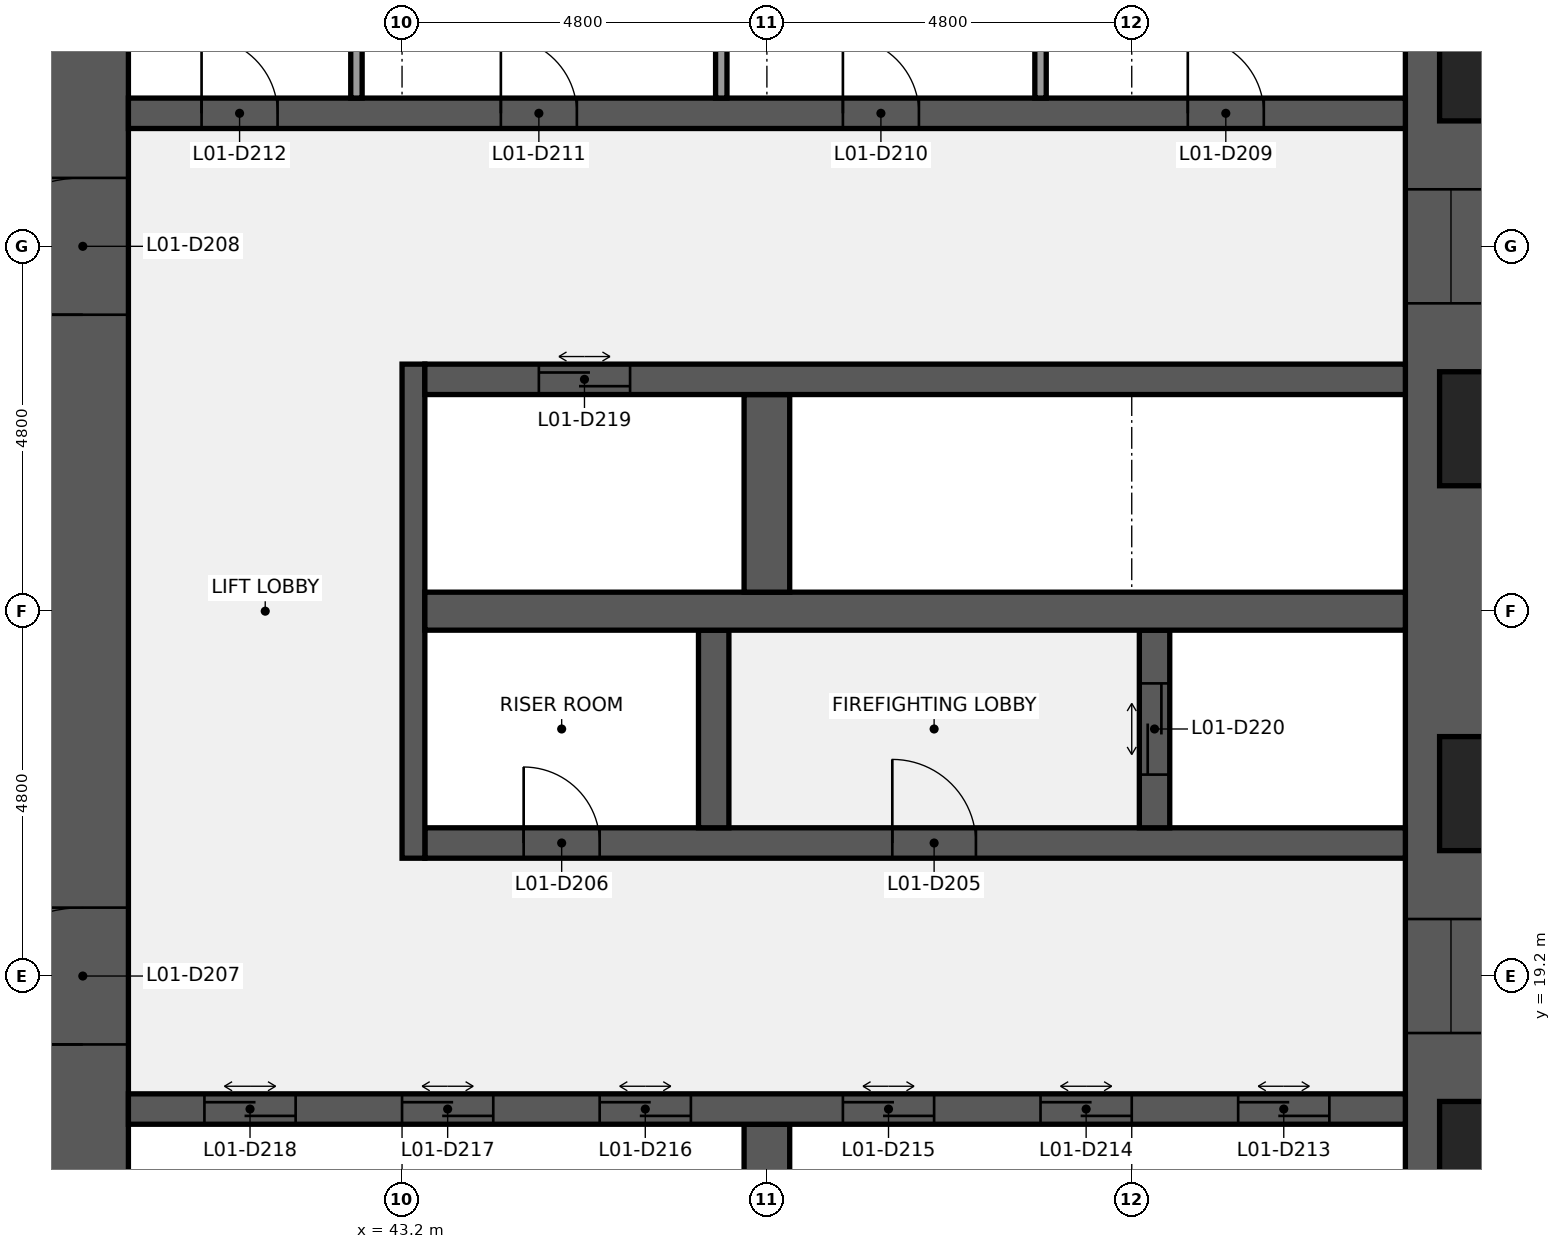
"""IFC4 building model, lengths in metres.
Left out: names, types, materials, properties, quantities, classifications, styles, units other than length and angle.
Written with IfcOpenShell. Run it as: python <this file> out.ifc"""

import sys

from ifc_helpers import new_model, si_unit, direction, frame, frame_2d, origin, place, context, subcontext, project, spatial, rectangle, extrude, element, fill, save


model = new_model("IFC4")
c1 = context("Model", 3, precision=1e-05, world=origin(), true_north=direction((0.0, 1.0)))
c2 = subcontext(c1, "Body", "Model", "MODEL_VIEW")
j1 = project(units=[si_unit("LENGTHUNIT", "METRE"), si_unit("PLANEANGLEUNIT", "RADIAN")], contexts=[c1])
p1 = place(None, origin())
s1 = spatial("IfcSite", under=j1, at=p1, CompositionType="ELEMENT")
p2 = place(p1, origin())
s2 = spatial("IfcBuilding", under=s1, at=p2, CompositionType="ELEMENT")
p3 = place(p2, frame((0.0, 0.0, 12.6)))
s3 = spatial("IfcBuildingStorey", under=s2, at=p3, CompositionType="ELEMENT", Elevation=12.6)
p4 = place(p3, frame((57.0, 38.4, 0.0), z_axis=(0.0, 0.0, 1.0), x_axis=(0.0, -1.0, 0.0)))
e1 = element("IfcWall", 1, at=p4, inside=s3, PredefinedType="SHEAR", context=c2, shape_type="SweptSolid", body=[
    extrude(rectangle(XDim=28.8, YDim=1.2, at=frame_2d((14.4, 0.0))), origin(), (0.0, 0.0, 1.0), 4.24),
])
p5 = place(p4, frame((18.45, 0.0, 0.9)))
e2 = element("IfcOpeningElement", 2, at=p5, cuts=e1, PredefinedType="OPENING", context=c2, shape_type="SweptSolid", body=[
    extrude(rectangle(XDim=1.5, YDim=1.5, at=frame_2d((0.75, 0.75))), frame((0.0, 0.61, 0.0), z_axis=(0.0, -1.0, 0.0), x_axis=(1.0, 0.0, 0.0)), (0.0, 0.0, 1.0), 1.22),
])
p6 = place(p4, frame((8.85, 0.0, 0.9)))
e3 = element("IfcOpeningElement", 3, at=p6, cuts=e1, PredefinedType="OPENING", context=c2, shape_type="SweptSolid", body=[
    extrude(rectangle(XDim=1.5, YDim=1.5, at=frame_2d((0.75, 0.75))), frame((0.0, 0.61, 0.0), z_axis=(0.0, -1.0, 0.0), x_axis=(1.0, 0.0, 0.0)), (0.0, 0.0, 1.0), 1.22),
])
p7 = place(p3, frame((39.0, 9.6, 0.0), z_axis=(0.0, 0.0, 1.0), x_axis=(0.0, 1.0, 0.0)))
e4 = element("IfcWall", 4, at=p7, inside=s3, PredefinedType="SHEAR", context=c2, shape_type="SweptSolid", body=[
    extrude(rectangle(XDim=28.8, YDim=1.2, at=frame_2d((14.4, 0.0))), origin(), (0.0, 0.0, 1.0), 4.24),
])
p8 = place(p7, frame((8.7, 0.0, 0.0)))
e5 = element("IfcOpeningElement", 5, at=p8, cuts=e4, PredefinedType="OPENING", context=c2, shape_type="SweptSolid", body=[
    extrude(rectangle(XDim=1.8, YDim=2.1, at=frame_2d((0.9, 1.05))), frame((0.0, 0.61, 0.0), z_axis=(0.0, -1.0, 0.0), x_axis=(1.0, 0.0, 0.0)), (0.0, 0.0, 1.0), 1.22),
])
p9 = place(p7, frame((18.3, 0.0, 0.0)))
e6 = element("IfcOpeningElement", 6, at=p9, cuts=e4, PredefinedType="OPENING", context=c2, shape_type="SweptSolid", body=[
    extrude(rectangle(XDim=1.8, YDim=2.1, at=frame_2d((0.9, 1.05))), frame((0.0, 0.61, 0.0), z_axis=(0.0, -1.0, 0.0), x_axis=(1.0, 0.0, 0.0)), (0.0, 0.0, 1.0), 1.22),
])
p10 = place(p3, frame((48.0, 14.65, 0.0), z_axis=(0.0, 0.0, 1.0), x_axis=(0.0, 1.0, 0.0)))
e7 = element("IfcWall", 7, at=p10, inside=s3, PredefinedType="SHEAR", context=c2, shape_type="SweptSolid", body=[
    extrude(rectangle(XDim=2.6, YDim=0.6, at=frame_2d((1.3, 0.0))), origin(), (0.0, 0.0, 1.0), 4.24),
])
p11 = place(p3, frame((39.6, 17.45, 0.0), z_axis=(0.0, 0.0, 1.0), x_axis=(1.0, 0.0, 0.0)))
e8 = element("IfcWall", 8, at=p11, inside=s3, PredefinedType="SHEAR", context=c2, shape_type="SweptSolid", body=[
    extrude(rectangle(XDim=16.8, YDim=0.4, at=frame_2d((8.4, 0.0))), origin(), (0.0, 0.0, 1.0), 4.24),
])
p12 = place(p11, frame((14.6, 0.0, 0.0)))
e9 = element("IfcOpeningElement", 9, at=p12, cuts=e8, PredefinedType="OPENING", context=c2, shape_type="SweptSolid", body=[
    extrude(rectangle(XDim=1.2, YDim=2.1, at=frame_2d((0.6, 1.05))), frame((0.0, 0.21, 0.0), z_axis=(0.0, -1.0, 0.0), x_axis=(1.0, 0.0, 0.0)), (0.0, 0.0, 1.0), 0.42),
])
p13 = place(p11, frame((12.0, 0.0, 0.0)))
e10 = element("IfcOpeningElement", 10, at=p13, cuts=e8, PredefinedType="OPENING", context=c2, shape_type="SweptSolid", body=[
    extrude(rectangle(XDim=1.2, YDim=2.1, at=frame_2d((0.6, 1.05))), frame((0.0, 0.21, 0.0), z_axis=(0.0, -1.0, 0.0), x_axis=(1.0, 0.0, 0.0)), (0.0, 0.0, 1.0), 0.42),
])
p14 = place(p11, frame((9.4, 0.0, 0.0)))
e11 = element("IfcOpeningElement", 11, at=p14, cuts=e8, PredefinedType="OPENING", context=c2, shape_type="SweptSolid", body=[
    extrude(rectangle(XDim=1.2, YDim=2.1, at=frame_2d((0.6, 1.05))), frame((0.0, 0.21, 0.0), z_axis=(0.0, -1.0, 0.0), x_axis=(1.0, 0.0, 0.0)), (0.0, 0.0, 1.0), 0.42),
])
p15 = place(p11, frame((6.2, 0.0, 0.0)))
e12 = element("IfcOpeningElement", 12, at=p15, cuts=e8, PredefinedType="OPENING", context=c2, shape_type="SweptSolid", body=[
    extrude(rectangle(XDim=1.2, YDim=2.1, at=frame_2d((0.6, 1.05))), frame((0.0, 0.21, 0.0), z_axis=(0.0, -1.0, 0.0), x_axis=(1.0, 0.0, 0.0)), (0.0, 0.0, 1.0), 0.42),
])
p16 = place(p11, frame((3.6, 0.0, 0.0)))
e13 = element("IfcOpeningElement", 13, at=p16, cuts=e8, PredefinedType="OPENING", context=c2, shape_type="SweptSolid", body=[
    extrude(rectangle(XDim=1.2, YDim=2.1, at=frame_2d((0.6, 1.05))), frame((0.0, 0.21, 0.0), z_axis=(0.0, -1.0, 0.0), x_axis=(1.0, 0.0, 0.0)), (0.0, 0.0, 1.0), 0.42),
])
p17 = place(p11, frame((1.0, 0.0, 0.0)))
e14 = element("IfcOpeningElement", 14, at=p17, cuts=e8, PredefinedType="OPENING", context=c2, shape_type="SweptSolid", body=[
    extrude(rectangle(XDim=1.2, YDim=2.1, at=frame_2d((0.6, 1.05))), frame((0.0, 0.21, 0.0), z_axis=(0.0, -1.0, 0.0), x_axis=(1.0, 0.0, 0.0)), (0.0, 0.0, 1.0), 0.42),
])
p18 = place(p3, frame((43.5, 20.95, 0.0), z_axis=(0.0, 0.0, 1.0), x_axis=(1.0, 0.0, 0.0)))
e15 = element("IfcWall", 15, at=p18, inside=s3, PredefinedType="SHEAR", context=c2, shape_type="SweptSolid", body=[
    extrude(rectangle(XDim=12.9, YDim=0.4, at=frame_2d((6.45, 0.0))), origin(), (0.0, 0.0, 1.0), 4.24),
])
p19 = place(p18, frame((6.15, 0.0, 0.0)))
e16 = element("IfcOpeningElement", 16, at=p19, cuts=e15, PredefinedType="OPENING", context=c2, shape_type="SweptSolid", body=[
    extrude(rectangle(XDim=1.1, YDim=2.1, at=frame_2d((0.55, 1.05))), frame((0.0, 0.21, 0.0), z_axis=(0.0, -1.0, 0.0), x_axis=(1.0, 0.0, 0.0)), (0.0, 0.0, 1.0), 0.42),
])
p20 = place(p18, frame((1.3, 0.0, 0.0)))
e17 = element("IfcOpeningElement", 17, at=p20, cuts=e15, PredefinedType="OPENING", context=c2, shape_type="SweptSolid", body=[
    extrude(rectangle(XDim=1.0, YDim=2.1, at=frame_2d((0.5, 1.05))), frame((0.0, 0.21, 0.0), z_axis=(0.0, -1.0, 0.0), x_axis=(1.0, 0.0, 0.0)), (0.0, 0.0, 1.0), 0.42),
])
p21 = place(p3, frame((43.35, 20.75, 0.0), z_axis=(0.0, 0.0, 1.0), x_axis=(0.0, 1.0, 0.0)))
e18 = element("IfcWall", 18, at=p21, inside=s3, PredefinedType="SHEAR", context=c2, shape_type="SweptSolid", body=[
    extrude(rectangle(XDim=6.5, YDim=0.3, at=frame_2d((3.25, 0.0))), origin(), (0.0, 0.0, 1.0), 4.24),
])
p22 = place(p3, frame((53.1, 21.15, 0.0), z_axis=(0.0, 0.0, 1.0), x_axis=(0.0, 1.0, 0.0)))
e19 = element("IfcWall", 19, at=p22, inside=s3, PredefinedType="SHEAR", context=c2, shape_type="SweptSolid", body=[
    extrude(rectangle(XDim=2.6, YDim=0.4, at=frame_2d((1.3, 0.0))), origin(), (0.0, 0.0, 1.0), 4.24),
])
p23 = place(p22, frame((0.7, 0.0, 0.0)))
e20 = element("IfcOpeningElement", 20, at=p23, cuts=e19, PredefinedType="OPENING", context=c2, shape_type="SweptSolid", body=[
    extrude(rectangle(XDim=1.2, YDim=2.1, at=frame_2d((0.6, 1.05))), frame((0.0, 0.21, 0.0), z_axis=(0.0, -1.0, 0.0), x_axis=(1.0, 0.0, 0.0)), (0.0, 0.0, 1.0), 0.42),
])
p24 = place(p3, frame((47.3, 21.15, 0.0), z_axis=(0.0, 0.0, 1.0), x_axis=(0.0, 1.0, 0.0)))
e21 = element("IfcWall", 21, at=p24, inside=s3, PredefinedType="SHEAR", context=c2, shape_type="SweptSolid", body=[
    extrude(rectangle(XDim=2.6, YDim=0.4, at=frame_2d((1.3, 0.0))), origin(), (0.0, 0.0, 1.0), 4.24),
])
p25 = place(p3, frame((43.5, 24.0, 0.0), z_axis=(0.0, 0.0, 1.0), x_axis=(1.0, 0.0, 0.0)))
e22 = element("IfcWall", 22, at=p25, inside=s3, PredefinedType="SHEAR", context=c2, shape_type="SweptSolid", body=[
    extrude(rectangle(XDim=12.9, YDim=0.5, at=frame_2d((6.45, 0.0))), origin(), (0.0, 0.0, 1.0), 4.24),
])
p26 = place(p3, frame((48.0, 24.25, 0.0), z_axis=(0.0, 0.0, 1.0), x_axis=(0.0, 1.0, 0.0)))
e23 = element("IfcWall", 23, at=p26, inside=s3, PredefinedType="SHEAR", context=c2, shape_type="SweptSolid", body=[
    extrude(rectangle(XDim=2.6, YDim=0.6, at=frame_2d((1.3, 0.0))), origin(), (0.0, 0.0, 1.0), 4.24),
])
p27 = place(p3, frame((43.5, 27.05, 0.0), z_axis=(0.0, 0.0, 1.0), x_axis=(1.0, 0.0, 0.0)))
e24 = element("IfcWall", 24, at=p27, inside=s3, PredefinedType="SHEAR", context=c2, shape_type="SweptSolid", body=[
    extrude(rectangle(XDim=12.9, YDim=0.4, at=frame_2d((6.45, 0.0))), origin(), (0.0, 0.0, 1.0), 4.24),
])
p28 = place(p27, frame((1.5, 0.0, 0.0)))
e25 = element("IfcOpeningElement", 25, at=p28, cuts=e24, PredefinedType="OPENING", context=c2, shape_type="SweptSolid", body=[
    extrude(rectangle(XDim=1.2, YDim=2.1, at=frame_2d((0.6, 1.05))), frame((0.0, 0.21, 0.0), z_axis=(0.0, -1.0, 0.0), x_axis=(1.0, 0.0, 0.0)), (0.0, 0.0, 1.0), 0.42),
])
p29 = place(p3, frame((39.6, 30.55, 0.0), z_axis=(0.0, 0.0, 1.0), x_axis=(1.0, 0.0, 0.0)))
e26 = element("IfcWall", 26, at=p29, inside=s3, PredefinedType="SHEAR", context=c2, shape_type="SweptSolid", body=[
    extrude(rectangle(XDim=16.8, YDim=0.4, at=frame_2d((8.4, 0.0))), origin(), (0.0, 0.0, 1.0), 4.24),
])
p30 = place(p29, frame((13.938, 0.0, 0.0)))
e27 = element("IfcOpeningElement", 27, at=p30, cuts=e26, PredefinedType="OPENING", context=c2, shape_type="SweptSolid", body=[
    extrude(rectangle(XDim=1.0, YDim=2.1, at=frame_2d((0.5, 1.05))), frame((0.0, 0.21, 0.0), z_axis=(0.0, -1.0, 0.0), x_axis=(1.0, 0.0, 0.0)), (0.0, 0.0, 1.0), 0.42),
])
p31 = place(p29, frame((9.4, 0.0, 0.0)))
e28 = element("IfcOpeningElement", 28, at=p31, cuts=e26, PredefinedType="OPENING", context=c2, shape_type="SweptSolid", body=[
    extrude(rectangle(XDim=1.0, YDim=2.1, at=frame_2d((0.5, 1.05))), frame((0.0, 0.21, 0.0), z_axis=(0.0, -1.0, 0.0), x_axis=(1.0, 0.0, 0.0)), (0.0, 0.0, 1.0), 0.42),
])
p32 = place(p29, frame((4.9, 0.0, 0.0)))
e29 = element("IfcOpeningElement", 29, at=p32, cuts=e26, PredefinedType="OPENING", context=c2, shape_type="SweptSolid", body=[
    extrude(rectangle(XDim=1.0, YDim=2.1, at=frame_2d((0.5, 1.05))), frame((0.0, 0.21, 0.0), z_axis=(0.0, -1.0, 0.0), x_axis=(1.0, 0.0, 0.0)), (0.0, 0.0, 1.0), 0.42),
])
p33 = place(p29, frame((0.962, 0.0, 0.0)))
e30 = element("IfcOpeningElement", 30, at=p33, cuts=e26, PredefinedType="OPENING", context=c2, shape_type="SweptSolid", body=[
    extrude(rectangle(XDim=1.0, YDim=2.1, at=frame_2d((0.5, 1.05))), frame((0.0, 0.21, 0.0), z_axis=(0.0, -1.0, 0.0), x_axis=(1.0, 0.0, 0.0)), (0.0, 0.0, 1.0), 0.42),
])
for number, where, z_axis, x_axis in (
    (31, (51.6, 30.75, 0.0), (0.0, 0.0, 1.0), (0.0, 1.0, 0.0)),
    (32, (47.4, 30.75, 0.0), (0.0, 0.0, 1.0), (0.0, 1.0, 0.0)),
    (33, (42.6, 30.75, 0.0), (0.0, 0.0, 1.0), (0.0, 1.0, 0.0)),
):
    element("IfcWall", number, at=place(p3, frame(where, z_axis=z_axis, x_axis=x_axis)), inside=s3, PredefinedType="PARTITIONING", context=c2, shape_type="SweptSolid", body=[
        extrude(rectangle(XDim=2.6, YDim=0.15, at=frame_2d((1.3, 0.0))), origin(), (0.0, 0.0, 1.0), 4.24),
    ])
p34 = place(p19, origin())
e34 = element("IfcDoor", 34, at=p34, inside=s3, OperationType="SINGLE_SWING_LEFT", PredefinedType="DOOR", context=c2, shape_type="SweptSolid", body=[
    extrude(rectangle(XDim=1.1, YDim=2.1, at=frame_2d((0.55, 1.05))), frame((0.0, 0.025, 0.0), z_axis=(0.0, -1.0, 0.0), x_axis=(1.0, 0.0, 0.0)), (0.0, 0.0, 1.0), 0.05),
])
fill(e16, e34)
p35 = place(p20, origin())
e35 = element("IfcDoor", 35, at=p35, inside=s3, OperationType="SINGLE_SWING_LEFT", PredefinedType="DOOR", context=c2, shape_type="SweptSolid", body=[
    extrude(rectangle(XDim=1.0, YDim=2.1, at=frame_2d((0.5, 1.05))), frame((0.0, 0.025, 0.0), z_axis=(0.0, -1.0, 0.0), x_axis=(1.0, 0.0, 0.0)), (0.0, 0.0, 1.0), 0.05),
])
fill(e17, e35)
p36 = place(p8, origin())
e36 = element("IfcDoor", 36, at=p36, inside=s3, OperationType="DOUBLE_DOOR_SINGLE_SWING", PredefinedType="DOOR", context=c2, shape_type="SweptSolid", body=[
    extrude(rectangle(XDim=1.8, YDim=2.1, at=frame_2d((0.9, 1.05))), frame((0.0, 0.025, 0.0), z_axis=(0.0, -1.0, 0.0), x_axis=(1.0, 0.0, 0.0)), (0.0, 0.0, 1.0), 0.05),
])
fill(e5, e36)
p37 = place(p9, origin())
e37 = element("IfcDoor", 37, at=p37, inside=s3, OperationType="DOUBLE_DOOR_SINGLE_SWING", PredefinedType="DOOR", context=c2, shape_type="SweptSolid", body=[
    extrude(rectangle(XDim=1.8, YDim=2.1, at=frame_2d((0.9, 1.05))), frame((0.0, 0.025, 0.0), z_axis=(0.0, -1.0, 0.0), x_axis=(1.0, 0.0, 0.0)), (0.0, 0.0, 1.0), 0.05),
])
fill(e6, e37)
p38 = place(p30, origin())
e38 = element("IfcDoor", 38, at=p38, inside=s3, OperationType="SINGLE_SWING_LEFT", PredefinedType="DOOR", context=c2, shape_type="SweptSolid", body=[
    extrude(rectangle(XDim=1.0, YDim=2.1, at=frame_2d((0.5, 1.05))), frame((0.0, 0.025, 0.0), z_axis=(0.0, -1.0, 0.0), x_axis=(1.0, 0.0, 0.0)), (0.0, 0.0, 1.0), 0.05),
])
fill(e27, e38)
p39 = place(p31, origin())
e39 = element("IfcDoor", 39, at=p39, inside=s3, OperationType="SINGLE_SWING_LEFT", PredefinedType="DOOR", context=c2, shape_type="SweptSolid", body=[
    extrude(rectangle(XDim=1.0, YDim=2.1, at=frame_2d((0.5, 1.05))), frame((0.0, 0.025, 0.0), z_axis=(0.0, -1.0, 0.0), x_axis=(1.0, 0.0, 0.0)), (0.0, 0.0, 1.0), 0.05),
])
fill(e28, e39)
p40 = place(p32, origin())
e40 = element("IfcDoor", 40, at=p40, inside=s3, OperationType="SINGLE_SWING_LEFT", PredefinedType="DOOR", context=c2, shape_type="SweptSolid", body=[
    extrude(rectangle(XDim=1.0, YDim=2.1, at=frame_2d((0.5, 1.05))), frame((0.0, 0.025, 0.0), z_axis=(0.0, -1.0, 0.0), x_axis=(1.0, 0.0, 0.0)), (0.0, 0.0, 1.0), 0.05),
])
fill(e29, e40)
p41 = place(p33, origin())
e41 = element("IfcDoor", 41, at=p41, inside=s3, OperationType="SINGLE_SWING_LEFT", PredefinedType="DOOR", context=c2, shape_type="SweptSolid", body=[
    extrude(rectangle(XDim=1.0, YDim=2.1, at=frame_2d((0.5, 1.05))), frame((0.0, 0.025, 0.0), z_axis=(0.0, -1.0, 0.0), x_axis=(1.0, 0.0, 0.0)), (0.0, 0.0, 1.0), 0.05),
])
fill(e30, e41)
p42 = place(p12, origin())
e42 = element("IfcDoor", 42, at=p42, inside=s3, OperationType="DOUBLE_DOOR_SLIDING", PredefinedType="DOOR", context=c2, shape_type="SweptSolid", body=[
    extrude(rectangle(XDim=1.2, YDim=2.1, at=frame_2d((0.6, 1.05))), frame((0.0, 0.025, 0.0), z_axis=(0.0, -1.0, 0.0), x_axis=(1.0, 0.0, 0.0)), (0.0, 0.0, 1.0), 0.05),
])
fill(e9, e42)
p43 = place(p13, origin())
e43 = element("IfcDoor", 43, at=p43, inside=s3, OperationType="DOUBLE_DOOR_SLIDING", PredefinedType="DOOR", context=c2, shape_type="SweptSolid", body=[
    extrude(rectangle(XDim=1.2, YDim=2.1, at=frame_2d((0.6, 1.05))), frame((0.0, 0.025, 0.0), z_axis=(0.0, -1.0, 0.0), x_axis=(1.0, 0.0, 0.0)), (0.0, 0.0, 1.0), 0.05),
])
fill(e10, e43)
p44 = place(p14, origin())
e44 = element("IfcDoor", 44, at=p44, inside=s3, OperationType="DOUBLE_DOOR_SLIDING", PredefinedType="DOOR", context=c2, shape_type="SweptSolid", body=[
    extrude(rectangle(XDim=1.2, YDim=2.1, at=frame_2d((0.6, 1.05))), frame((0.0, 0.025, 0.0), z_axis=(0.0, -1.0, 0.0), x_axis=(1.0, 0.0, 0.0)), (0.0, 0.0, 1.0), 0.05),
])
fill(e11, e44)
p45 = place(p15, origin())
e45 = element("IfcDoor", 45, at=p45, inside=s3, OperationType="DOUBLE_DOOR_SLIDING", PredefinedType="DOOR", context=c2, shape_type="SweptSolid", body=[
    extrude(rectangle(XDim=1.2, YDim=2.1, at=frame_2d((0.6, 1.05))), frame((0.0, 0.025, 0.0), z_axis=(0.0, -1.0, 0.0), x_axis=(1.0, 0.0, 0.0)), (0.0, 0.0, 1.0), 0.05),
])
fill(e12, e45)
p46 = place(p16, origin())
e46 = element("IfcDoor", 46, at=p46, inside=s3, OperationType="DOUBLE_DOOR_SLIDING", PredefinedType="DOOR", context=c2, shape_type="SweptSolid", body=[
    extrude(rectangle(XDim=1.2, YDim=2.1, at=frame_2d((0.6, 1.05))), frame((0.0, 0.025, 0.0), z_axis=(0.0, -1.0, 0.0), x_axis=(1.0, 0.0, 0.0)), (0.0, 0.0, 1.0), 0.05),
])
fill(e13, e46)
p47 = place(p17, origin())
e47 = element("IfcDoor", 47, at=p47, inside=s3, OperationType="DOUBLE_DOOR_SLIDING", PredefinedType="DOOR", context=c2, shape_type="SweptSolid", body=[
    extrude(rectangle(XDim=1.2, YDim=2.1, at=frame_2d((0.6, 1.05))), frame((0.0, 0.025, 0.0), z_axis=(0.0, -1.0, 0.0), x_axis=(1.0, 0.0, 0.0)), (0.0, 0.0, 1.0), 0.05),
])
fill(e14, e47)
p48 = place(p28, origin())
e48 = element("IfcDoor", 48, at=p48, inside=s3, OperationType="DOUBLE_DOOR_SLIDING", PredefinedType="DOOR", context=c2, shape_type="SweptSolid", body=[
    extrude(rectangle(XDim=1.2, YDim=2.1, at=frame_2d((0.6, 1.05))), frame((0.0, 0.025, 0.0), z_axis=(0.0, -1.0, 0.0), x_axis=(1.0, 0.0, 0.0)), (0.0, 0.0, 1.0), 0.05),
])
fill(e25, e48)
p49 = place(p23, origin())
e49 = element("IfcDoor", 49, at=p49, inside=s3, OperationType="DOUBLE_DOOR_SLIDING", PredefinedType="DOOR", context=c2, shape_type="SweptSolid", body=[
    extrude(rectangle(XDim=1.2, YDim=2.1, at=frame_2d((0.6, 1.05))), frame((0.0, 0.025, 0.0), z_axis=(0.0, -1.0, 0.0), x_axis=(1.0, 0.0, 0.0)), (0.0, 0.0, 1.0), 0.05),
])
fill(e20, e49)
p50 = place(p5, origin())
e50 = element("IfcWindow", 50, at=p50, inside=s3, PartitioningType="SINGLE_PANEL", PredefinedType="WINDOW", context=c2, shape_type="SweptSolid", body=[
    extrude(rectangle(XDim=1.5, YDim=1.5, at=frame_2d((0.75, 0.75))), frame((0.0, 0.03, 0.0), z_axis=(0.0, -1.0, 0.0), x_axis=(1.0, 0.0, 0.0)), (0.0, 0.0, 1.0), 0.06),
])
fill(e2, e50)
p51 = place(p6, origin())
e51 = element("IfcWindow", 51, at=p51, inside=s3, PartitioningType="SINGLE_PANEL", PredefinedType="WINDOW", context=c2, shape_type="SweptSolid", body=[
    extrude(rectangle(XDim=1.5, YDim=1.5, at=frame_2d((0.75, 0.75))), frame((0.0, 0.03, 0.0), z_axis=(0.0, -1.0, 0.0), x_axis=(1.0, 0.0, 0.0)), (0.0, 0.0, 1.0), 0.06),
])
fill(e3, e51)
save(model, sys.argv[1])
